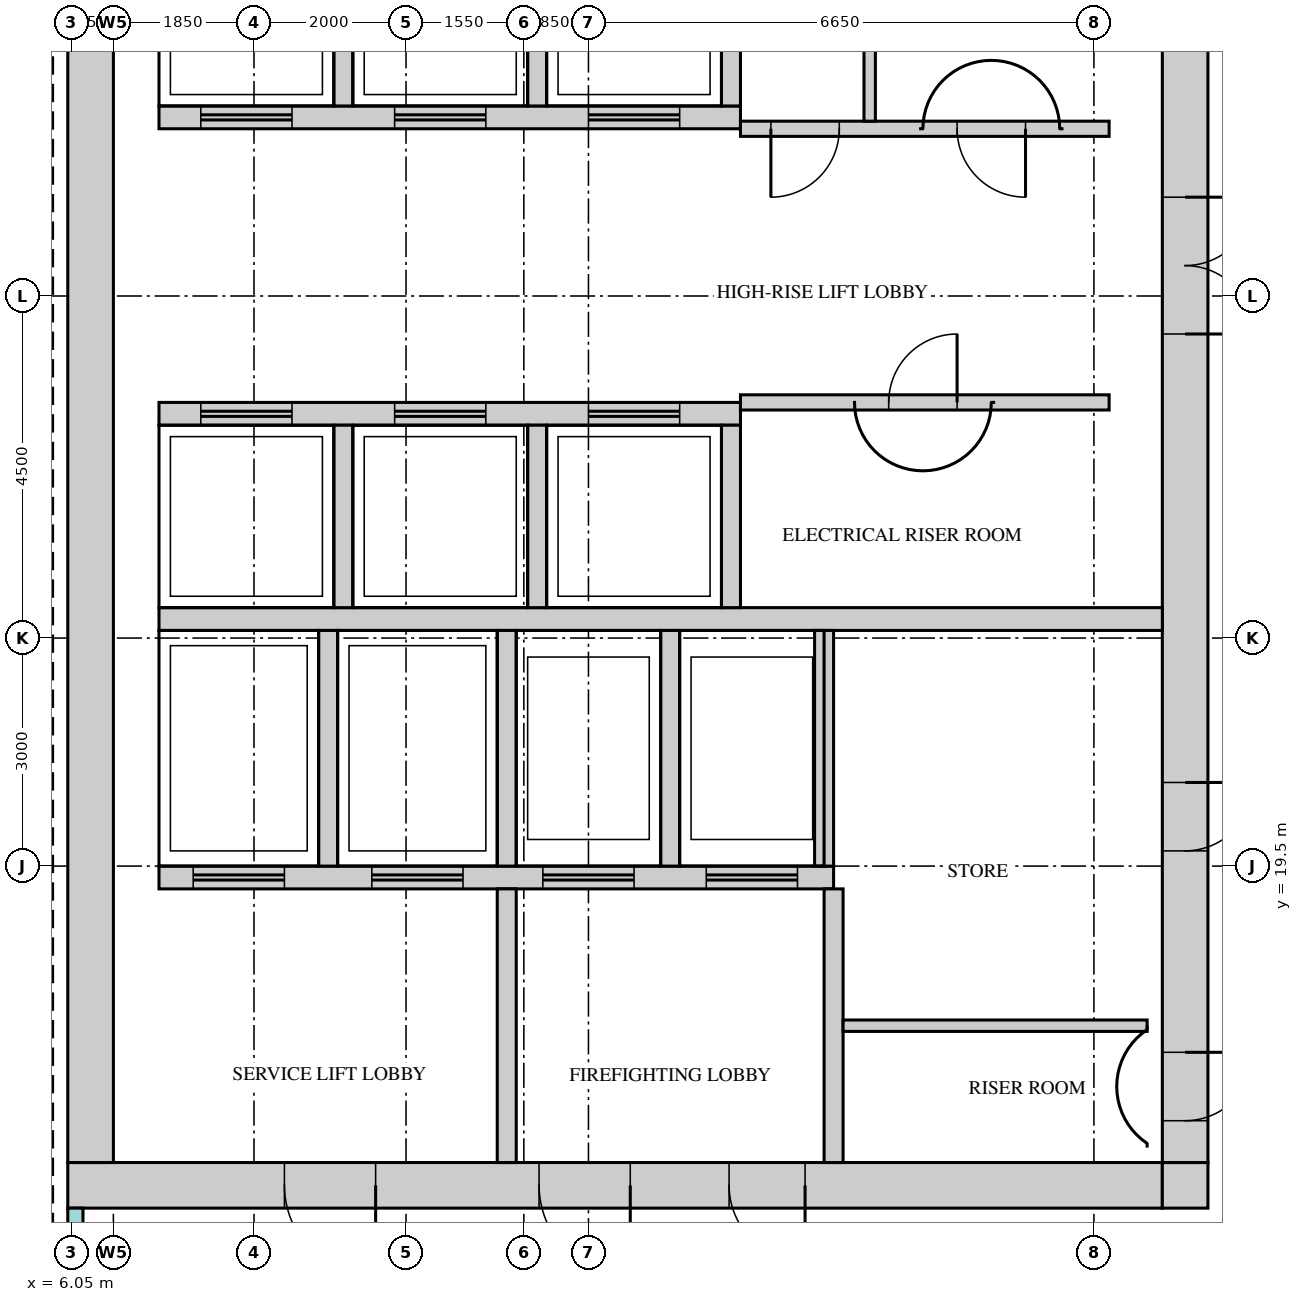
"""IFC4 building model, lengths in metres.
Left out: names, types, materials, properties, quantities, classifications, styles, units other than length and angle.
Written with IfcOpenShell. Run it as: python <this file> out.ifc"""

import sys

from ifc_helpers import new_model, si_unit, direction, frame, frame_2d, origin, place, context, subcontext, project, spatial, rectangle, extrude, source, transform, mapped, element, fill, save


model = new_model("IFC4")
c1 = context("Model", 3, precision=1e-05, world=origin(), true_north=direction((0.0, 1.0)))
c2 = subcontext(c1, "Body", "Model", "MODEL_VIEW")
j1 = project(units=[si_unit("LENGTHUNIT", "METRE"), si_unit("PLANEANGLEUNIT", "RADIAN")], contexts=[c1])
p1 = place(None, origin())
s1 = spatial("IfcSite", under=j1, at=p1, CompositionType="ELEMENT")
p2 = place(p1, origin())
s2 = spatial("IfcBuilding", under=s1, at=p2, CompositionType="ELEMENT")
p3 = place(p2, frame((0.0, 0.0, 302.2)))
s3 = spatial("IfcBuildingStorey", under=s2, at=p3, CompositionType="ELEMENT", Elevation=302.2)
m1 = source(origin(), c2, "Body", "SweptSolid", [
    extrude(rectangle(XDim=14.4, YDim=0.6, at=frame_2d((7.2, 0.0))), origin(), (0.0, 0.0, 1.0), 3.75),
])
p4 = place(p3, frame((6.0, 15.3, 0.0), z_axis=(0.0, 0.0, 1.0), x_axis=(1.0, 0.0, 0.0)))
e1 = element("IfcWall", 1, at=p4, inside=s3, PredefinedType="SHEAR", context=c2, shape_type="MappedRepresentation", body=[
    mapped(m1, transform((0.0, 0.0, 0.0))),
])
m2 = source(origin(), c2, "Body", "SweptSolid", [
    extrude(rectangle(XDim=1.2, YDim=2.1, at=frame_2d((0.6, 1.05))), frame((0.0, 0.31, 0.0), z_axis=(0.0, -1.0, 0.0), x_axis=(1.0, 0.0, 0.0)), (0.0, 0.0, 1.0), 0.62),
])
p5 = place(p4, frame((6.2, 0.0, 0.0)))
e2 = element("IfcOpeningElement", 2, at=p5, cuts=e1, PredefinedType="OPENING", context=c2, shape_type="MappedRepresentation", body=[
    mapped(m2, transform((0.0, 0.0, 0.0))),
])
p6 = place(p4, frame((2.85, 0.0, 0.0)))
e3 = element("IfcOpeningElement", 3, at=p6, cuts=e1, PredefinedType="OPENING", context=c2, shape_type="MappedRepresentation", body=[
    mapped(m2, transform((0.0, 0.0, 0.0))),
])
m3 = source(origin(), c2, "Body", "SweptSolid", [
    extrude(rectangle(XDim=1.0, YDim=2.1, at=frame_2d((0.5, 1.05))), frame((0.0, 0.31, 0.0), z_axis=(0.0, -1.0, 0.0), x_axis=(1.0, 0.0, 0.0)), (0.0, 0.0, 1.0), 0.62),
])
p7 = place(p4, frame((8.7, 0.0, 0.0)))
e4 = element("IfcOpeningElement", 4, at=p7, cuts=e1, PredefinedType="OPENING", context=c2, shape_type="MappedRepresentation", body=[
    mapped(m3, transform((0.0, 0.0, 0.0))),
])
m4 = source(origin(), c2, "Body", "SweptSolid", [
    extrude(rectangle(XDim=0.6, YDim=0.6, at=frame_2d((0.3, 0.0))), origin(), (0.0, 0.0, 1.0), 3.75),
])
p8 = place(p3, frame((20.4, 15.3, 0.0), z_axis=(0.0, 0.0, 1.0), x_axis=(1.0, 0.0, 0.0)))
e5 = element("IfcWall", 5, at=p8, inside=s3, PredefinedType="SHEAR", context=c2, shape_type="MappedRepresentation", body=[
    mapped(m4, transform((0.0, 0.0, 0.0))),
])
m5 = source(origin(), c2, "Body", "SweptSolid", [
    extrude(rectangle(XDim=22.8, YDim=0.6, at=frame_2d((11.4, 0.0))), origin(), (0.0, 0.0, 1.0), 3.75),
])
p9 = place(p3, frame((20.7, 15.6, 0.0), z_axis=(0.0, 0.0, 1.0), x_axis=(0.0, 1.0, 0.0)))
e6 = element("IfcWall", 6, at=p9, inside=s3, PredefinedType="SHEAR", context=c2, shape_type="MappedRepresentation", body=[
    mapped(m5, transform((0.0, 0.0, 0.0))),
])
m6 = source(origin(), c2, "Body", "SweptSolid", [
    extrude(rectangle(XDim=1.8, YDim=2.1, at=frame_2d((0.9, 1.05))), frame((0.0, 0.31, 0.0), z_axis=(0.0, -1.0, 0.0), x_axis=(1.0, 0.0, 0.0)), (0.0, 0.0, 1.0), 0.62),
])
p10 = place(p9, frame((10.9, 0.0, 0.0)))
e7 = element("IfcOpeningElement", 7, at=p10, cuts=e6, PredefinedType="OPENING", context=c2, shape_type="MappedRepresentation", body=[
    mapped(m6, transform((0.0, 0.0, 0.0))),
])
m7 = source(origin(), c2, "Body", "SweptSolid", [
    extrude(rectangle(XDim=0.9, YDim=2.1, at=frame_2d((0.45, 1.05))), frame((0.0, 0.31, 0.0), z_axis=(0.0, -1.0, 0.0), x_axis=(1.0, 0.0, 0.0)), (0.0, 0.0, 1.0), 0.62),
])
p11 = place(p9, frame((0.55, 0.0, 0.0)))
e8 = element("IfcOpeningElement", 8, at=p11, cuts=e6, PredefinedType="OPENING", context=c2, shape_type="MappedRepresentation", body=[
    mapped(m7, transform((0.0, 0.0, 0.0))),
])
p12 = place(p9, frame((4.1, 0.0, 0.0)))
e9 = element("IfcOpeningElement", 9, at=p12, cuts=e6, PredefinedType="OPENING", context=c2, shape_type="MappedRepresentation", body=[
    mapped(m7, transform((0.0, 0.0, 0.0))),
])
p13 = place(p3, frame((6.3, 15.6, 0.0), z_axis=(0.0, 0.0, 1.0), x_axis=(0.0, 1.0, 0.0)))
e10 = element("IfcWall", 10, at=p13, inside=s3, PredefinedType="SHEAR", context=c2, shape_type="MappedRepresentation", body=[
    mapped(m5, transform((0.0, 0.0, 0.0))),
])
m8 = source(origin(), c2, "Body", "SweptSolid", [
    extrude(rectangle(XDim=13.2, YDim=0.3, at=frame_2d((6.6, 0.0))), origin(), (0.0, 0.0, 1.0), 3.75),
])
p14 = place(p3, frame((7.2, 22.75, 0.0), z_axis=(0.0, 0.0, 1.0), x_axis=(1.0, 0.0, 0.0)))
e11 = element("IfcWall", 11, at=p14, inside=s3, PredefinedType="STANDARD", context=c2, shape_type="MappedRepresentation", body=[
    mapped(m8, transform((0.0, 0.0, 0.0))),
])
m9 = source(origin(), c2, "Body", "SweptSolid", [
    extrude(rectangle(XDim=8.875, YDim=0.3, at=frame_2d((4.438, 0.0))), origin(), (0.0, 0.0, 1.0), 3.75),
])
p15 = place(p3, frame((7.2, 19.35, 0.0), z_axis=(0.0, 0.0, 1.0), x_axis=(1.0, 0.0, 0.0)))
e12 = element("IfcWall", 12, at=p15, inside=s3, PredefinedType="STANDARD", context=c2, shape_type="MappedRepresentation", body=[
    mapped(m9, transform((0.0, 0.0, 0.0))),
])
m10 = source(origin(), c2, "Body", "SweptSolid", [
    extrude(rectangle(XDim=1.2, YDim=2.1, at=frame_2d((0.6, 1.05))), frame((0.0, 0.16, 0.0), z_axis=(0.0, -1.0, 0.0), x_axis=(1.0, 0.0, 0.0)), (0.0, 0.0, 1.0), 0.32),
])
p16 = place(p15, frame((0.45, 0.0, 0.0)))
e13 = element("IfcOpeningElement", 13, at=p16, cuts=e12, PredefinedType="OPENING", context=c2, shape_type="MappedRepresentation", body=[
    mapped(m10, transform((0.0, 0.0, 0.0))),
])
p17 = place(p15, frame((2.8, 0.0, 0.0)))
e14 = element("IfcOpeningElement", 14, at=p17, cuts=e12, PredefinedType="OPENING", context=c2, shape_type="MappedRepresentation", body=[
    mapped(m10, transform((0.0, 0.0, 0.0))),
])
p18 = place(p15, frame((5.05, 0.0, 0.0)))
e15 = element("IfcOpeningElement", 15, at=p18, cuts=e12, PredefinedType="OPENING", context=c2, shape_type="MappedRepresentation", body=[
    mapped(m10, transform((0.0, 0.0, 0.0))),
])
p19 = place(p15, frame((7.2, 0.0, 0.0)))
e16 = element("IfcOpeningElement", 16, at=p19, cuts=e12, PredefinedType="OPENING", context=c2, shape_type="MappedRepresentation", body=[
    mapped(m10, transform((0.0, 0.0, 0.0))),
])
m11 = source(origin(), c2, "Body", "SweptSolid", [
    extrude(rectangle(XDim=7.65, YDim=0.3, at=frame_2d((3.825, 0.0))), origin(), (0.0, 0.0, 1.0), 3.75),
])
p20 = place(p3, frame((7.2, 29.35, 0.0), z_axis=(0.0, 0.0, 1.0), x_axis=(1.0, 0.0, 0.0)))
e17 = element("IfcWall", 17, at=p20, inside=s3, PredefinedType="STANDARD", context=c2, shape_type="MappedRepresentation", body=[
    mapped(m11, transform((0.0, 0.0, 0.0))),
])
p21 = place(p20, frame((0.55, 0.0, 0.0)))
e18 = element("IfcOpeningElement", 18, at=p21, cuts=e17, PredefinedType="OPENING", context=c2, shape_type="MappedRepresentation", body=[
    mapped(m10, transform((0.0, 0.0, 0.0))),
])
p22 = place(p20, frame((3.1, 0.0, 0.0)))
e19 = element("IfcOpeningElement", 19, at=p22, cuts=e17, PredefinedType="OPENING", context=c2, shape_type="MappedRepresentation", body=[
    mapped(m10, transform((0.0, 0.0, 0.0))),
])
p23 = place(p20, frame((5.65, 0.0, 0.0)))
e20 = element("IfcOpeningElement", 20, at=p23, cuts=e17, PredefinedType="OPENING", context=c2, shape_type="MappedRepresentation", body=[
    mapped(m10, transform((0.0, 0.0, 0.0))),
])
p24 = place(p3, frame((7.2, 25.45, 0.0), z_axis=(0.0, 0.0, 1.0), x_axis=(1.0, 0.0, 0.0)))
e21 = element("IfcWall", 21, at=p24, inside=s3, PredefinedType="STANDARD", context=c2, shape_type="MappedRepresentation", body=[
    mapped(m11, transform((0.0, 0.0, 0.0))),
])
p25 = place(p24, frame((0.55, 0.0, 0.0)))
e22 = element("IfcOpeningElement", 22, at=p25, cuts=e21, PredefinedType="OPENING", context=c2, shape_type="MappedRepresentation", body=[
    mapped(m10, transform((0.0, 0.0, 0.0))),
])
p26 = place(p24, frame((3.1, 0.0, 0.0)))
e23 = element("IfcOpeningElement", 23, at=p26, cuts=e21, PredefinedType="OPENING", context=c2, shape_type="MappedRepresentation", body=[
    mapped(m10, transform((0.0, 0.0, 0.0))),
])
p27 = place(p24, frame((5.65, 0.0, 0.0)))
e24 = element("IfcOpeningElement", 24, at=p27, cuts=e21, PredefinedType="OPENING", context=c2, shape_type="MappedRepresentation", body=[
    mapped(m10, transform((0.0, 0.0, 0.0))),
])
m12 = source(origin(), c2, "Body", "SweptSolid", [
    extrude(rectangle(XDim=3.1, YDim=0.25, at=frame_2d((1.55, 0.0))), origin(), (0.0, 0.0, 1.0), 3.75),
])
for number, where, z_axis, x_axis in (
    (25, (9.425, 19.5, 0.0), (0.0, 0.0, 1.0), (0.0, 1.0, 0.0)),
    (26, (11.775, 19.5, 0.0), (0.0, 0.0, 1.0), (0.0, 1.0, 0.0)),
    (27, (13.925, 19.5, 0.0), (0.0, 0.0, 1.0), (0.0, 1.0, 0.0)),
    (28, (15.95, 19.5, 0.0), (0.0, 0.0, 1.0), (0.0, 1.0, 0.0)),
):
    element("IfcWall", number, at=place(p3, frame(where, z_axis=z_axis, x_axis=x_axis)), inside=s3, PredefinedType="STANDARD", context=c2, shape_type="MappedRepresentation", body=[
        mapped(m12, transform((0.0, 0.0, 0.0))),
    ])
m13 = source(origin(), c2, "Body", "SweptSolid", [
    extrude(rectangle(XDim=2.4, YDim=0.25, at=frame_2d((1.2, 0.0))), origin(), (0.0, 0.0, 1.0), 3.75),
])
for number, where, z_axis, x_axis in (
    (29, (9.625, 29.5, 0.0), (0.0, 0.0, 1.0), (0.0, 1.0, 0.0)),
    (30, (12.175, 29.5, 0.0), (0.0, 0.0, 1.0), (0.0, 1.0, 0.0)),
    (31, (14.725, 29.5, 0.0), (0.0, 0.0, 1.0), (0.0, 1.0, 0.0)),
):
    element("IfcWall", number, at=place(p3, frame(where, z_axis=z_axis, x_axis=x_axis)), inside=s3, PredefinedType="STANDARD", context=c2, shape_type="MappedRepresentation", body=[
        mapped(m13, transform((0.0, 0.0, 0.0))),
    ])
m14 = source(origin(), c2, "Body", "SweptSolid", [
    extrude(rectangle(XDim=2.4, YDim=0.25, at=frame_2d((1.2, 0.0))), origin(), (0.0, 0.0, 1.0), 3.75),
])
for number, where, z_axis, x_axis in (
    (32, (9.625, 22.9, 0.0), (0.0, 0.0, 1.0), (0.0, 1.0, 0.0)),
    (33, (12.175, 22.9, 0.0), (0.0, 0.0, 1.0), (0.0, 1.0, 0.0)),
    (34, (14.725, 22.9, 0.0), (0.0, 0.0, 1.0), (0.0, 1.0, 0.0)),
):
    element("IfcWall", number, at=place(p3, frame(where, z_axis=z_axis, x_axis=x_axis)), inside=s3, PredefinedType="STANDARD", context=c2, shape_type="MappedRepresentation", body=[
        mapped(m14, transform((0.0, 0.0, 0.0))),
    ])
m15 = source(origin(), c2, "Body", "SweptSolid", [
    extrude(rectangle(XDim=3.6, YDim=0.25, at=frame_2d((1.8, 0.0))), origin(), (0.0, 0.0, 1.0), 3.75),
])
for number, where, z_axis, x_axis in (
    (35, (16.075, 15.6, 0.0), (0.0, 0.0, 1.0), (0.0, 1.0, 0.0)),
    (36, (11.775, 15.6, 0.0), (0.0, 0.0, 1.0), (0.0, 1.0, 0.0)),
):
    element("IfcWall", number, at=place(p3, frame(where, z_axis=z_axis, x_axis=x_axis)), inside=s3, PredefinedType="STANDARD", context=c2, shape_type="MappedRepresentation", body=[
        mapped(m15, transform((0.0, 0.0, 0.0))),
    ])
m16 = source(origin(), c2, "Body", "SweptSolid", [
    extrude(rectangle(XDim=4.0, YDim=0.15, at=frame_2d((2.0, 0.0))), origin(), (0.0, 0.0, 1.0), 3.8),
])
p28 = place(p3, frame((16.2, 17.4, 0.0), z_axis=(0.0, 0.0, 1.0), x_axis=(1.0, 0.0, 0.0)))
e37 = element("IfcWall", 37, at=p28, inside=s3, PredefinedType="PARTITIONING", context=c2, shape_type="MappedRepresentation", body=[
    mapped(m16, transform((0.0, 0.0, 0.0))),
])
m17 = source(origin(), c2, "Body", "SweptSolid", [
    extrude(rectangle(XDim=4.85, YDim=0.2, at=frame_2d((2.425, 0.0))), origin(), (0.0, 0.0, 1.0), 3.8),
])
p29 = place(p3, frame((14.85, 25.6, 0.0), z_axis=(0.0, 0.0, 1.0), x_axis=(1.0, 0.0, 0.0)))
e38 = element("IfcWall", 38, at=p29, inside=s3, PredefinedType="PARTITIONING", context=c2, shape_type="MappedRepresentation", body=[
    mapped(m17, transform((0.0, 0.0, 0.0))),
])
m18 = source(origin(), c2, "Body", "SweptSolid", [
    extrude(rectangle(XDim=0.9, YDim=2.1, at=frame_2d((0.45, 1.05))), frame((0.0, 0.11, 0.0), z_axis=(0.0, -1.0, 0.0), x_axis=(1.0, 0.0, 0.0)), (0.0, 0.0, 1.0), 0.22),
])
p30 = place(p29, frame((1.95, 0.0, 0.0)))
e39 = element("IfcOpeningElement", 39, at=p30, cuts=e38, PredefinedType="OPENING", context=c2, shape_type="MappedRepresentation", body=[
    mapped(m18, transform((0.0, 0.0, 0.0))),
])
p31 = place(p3, frame((14.85, 29.2, 0.0), z_axis=(0.0, 0.0, 1.0), x_axis=(1.0, 0.0, 0.0)))
e40 = element("IfcWall", 40, at=p31, inside=s3, PredefinedType="PARTITIONING", context=c2, shape_type="MappedRepresentation", body=[
    mapped(m17, transform((0.0, 0.0, 0.0))),
])
p32 = place(p31, frame((0.4, 0.0, 0.0)))
e41 = element("IfcOpeningElement", 41, at=p32, cuts=e40, PredefinedType="OPENING", context=c2, shape_type="MappedRepresentation", body=[
    mapped(m18, transform((0.0, 0.0, 0.0))),
])
p33 = place(p31, frame((2.85, 0.0, 0.0)))
e42 = element("IfcOpeningElement", 42, at=p33, cuts=e40, PredefinedType="OPENING", context=c2, shape_type="MappedRepresentation", body=[
    mapped(m18, transform((0.0, 0.0, 0.0))),
])
m19 = source(origin(), c2, "Body", "SweptSolid", [
    extrude(rectangle(XDim=2.8, YDim=0.15, at=frame_2d((1.4, 0.0))), origin(), (0.0, 0.0, 1.0), 3.8),
])
p34 = place(p3, frame((16.55, 29.3, 0.0), z_axis=(0.0, 0.0, 1.0), x_axis=(0.0, 1.0, 0.0)))
e43 = element("IfcWall", 43, at=p34, inside=s3, PredefinedType="PARTITIONING", context=c2, shape_type="MappedRepresentation", body=[
    mapped(m19, transform((0.0, 0.0, 0.0))),
])
m20 = source(origin(), c2, "Body", "SweptSolid", [
    extrude(rectangle(XDim=0.9, YDim=2.1, at=frame_2d((0.45, 1.05))), frame((0.0, 0.025, 0.0), z_axis=(0.0, -1.0, 0.0), x_axis=(1.0, 0.0, 0.0)), (0.0, 0.0, 1.0), 0.05),
])
p35 = place(p30, origin())
e44 = element("IfcDoor", 44, at=p35, inside=s3, OperationType="SINGLE_SWING_LEFT", PredefinedType="DOOR", context=c2, shape_type="MappedRepresentation", body=[
    mapped(m20, transform((0.0, 0.0, 0.0))),
])
fill(e39, e44)
p36 = place(p32, origin())
e45 = element("IfcDoor", 45, at=p36, inside=s3, OperationType="SINGLE_SWING_LEFT", PredefinedType="DOOR", context=c2, shape_type="MappedRepresentation", body=[
    mapped(m20, transform((0.0, 0.0, 0.0))),
])
fill(e41, e45)
p37 = place(p33, origin())
e46 = element("IfcDoor", 46, at=p37, inside=s3, OperationType="SINGLE_SWING_RIGHT", PredefinedType="DOOR", context=c2, shape_type="MappedRepresentation", body=[
    mapped(m20, transform((0.0, 0.0, 0.0))),
])
fill(e42, e46)
m21 = source(origin(), c2, "Body", "SweptSolid", [
    extrude(rectangle(XDim=1.8, YDim=2.1, at=frame_2d((0.9, 1.05))), frame((0.0, 0.25, 0.0), z_axis=(0.0, -1.0, 0.0), x_axis=(1.0, 0.0, 0.0)), (0.0, 0.0, 1.0), 0.5),
])
p38 = place(p10, origin())
e47 = element("IfcDoor", 47, at=p38, inside=s3, OperationType="DOUBLE_DOOR_SINGLE_SWING", PredefinedType="DOOR", context=c2, shape_type="MappedRepresentation", body=[
    mapped(m21, transform((0.0, 0.0, 0.0))),
])
fill(e7, e47)
m22 = source(origin(), c2, "Body", "SweptSolid", [
    extrude(rectangle(XDim=0.9, YDim=2.1, at=frame_2d((0.45, 1.05))), frame((0.0, 0.25, 0.0), z_axis=(0.0, -1.0, 0.0), x_axis=(1.0, 0.0, 0.0)), (0.0, 0.0, 1.0), 0.5),
])
p39 = place(p11, origin())
e48 = element("IfcDoor", 48, at=p39, inside=s3, OperationType="SINGLE_SWING_RIGHT", PredefinedType="DOOR", context=c2, shape_type="MappedRepresentation", body=[
    mapped(m22, transform((0.0, 0.0, 0.0))),
])
fill(e8, e48)
p40 = place(p12, origin())
e49 = element("IfcDoor", 49, at=p40, inside=s3, OperationType="SINGLE_SWING_RIGHT", PredefinedType="DOOR", context=c2, shape_type="MappedRepresentation", body=[
    mapped(m22, transform((0.0, 0.0, 0.0))),
])
fill(e9, e49)
m23 = source(origin(), c2, "Body", "SweptSolid", [
    extrude(rectangle(XDim=1.2, YDim=2.1, at=frame_2d((0.6, 1.05))), frame((0.0, 0.25, 0.0), z_axis=(0.0, -1.0, 0.0), x_axis=(1.0, 0.0, 0.0)), (0.0, 0.0, 1.0), 0.5),
])
p41 = place(p5, origin())
e50 = element("IfcDoor", 50, at=p41, inside=s3, OperationType="SINGLE_SWING_RIGHT", PredefinedType="DOOR", context=c2, shape_type="MappedRepresentation", body=[
    mapped(m23, transform((0.0, 0.0, 0.0))),
])
fill(e2, e50)
p42 = place(p6, origin())
e51 = element("IfcDoor", 51, at=p42, inside=s3, OperationType="SINGLE_SWING_RIGHT", PredefinedType="DOOR", context=c2, shape_type="MappedRepresentation", body=[
    mapped(m23, transform((0.0, 0.0, 0.0))),
])
fill(e3, e51)
m24 = source(origin(), c2, "Body", "SweptSolid", [
    extrude(rectangle(XDim=1.0, YDim=2.1, at=frame_2d((0.5, 1.05))), frame((0.0, 0.25, 0.0), z_axis=(0.0, -1.0, 0.0), x_axis=(1.0, 0.0, 0.0)), (0.0, 0.0, 1.0), 0.5),
])
p43 = place(p7, origin())
e52 = element("IfcDoor", 52, at=p43, inside=s3, OperationType="SINGLE_SWING_RIGHT", PredefinedType="DOOR", context=c2, shape_type="MappedRepresentation", body=[
    mapped(m24, transform((0.0, 0.0, 0.0))),
])
fill(e4, e52)
m25 = source(origin(), c2, "Body", "SweptSolid", [
    extrude(rectangle(XDim=1.2, YDim=2.1, at=frame_2d((0.6, 1.05))), frame((0.0, 0.025, 0.0), z_axis=(0.0, -1.0, 0.0), x_axis=(1.0, 0.0, 0.0)), (0.0, 0.0, 1.0), 0.05),
])
p44 = place(p25, origin())
e53 = element("IfcDoor", 53, at=p44, inside=s3, OperationType="DOUBLE_DOOR_SLIDING", PredefinedType="DOOR", context=c2, shape_type="MappedRepresentation", body=[
    mapped(m25, transform((0.0, 0.0, 0.0))),
])
fill(e22, e53)
p45 = place(p26, origin())
e54 = element("IfcDoor", 54, at=p45, inside=s3, OperationType="DOUBLE_DOOR_SLIDING", PredefinedType="DOOR", context=c2, shape_type="MappedRepresentation", body=[
    mapped(m25, transform((0.0, 0.0, 0.0))),
])
fill(e23, e54)
p46 = place(p27, origin())
e55 = element("IfcDoor", 55, at=p46, inside=s3, OperationType="DOUBLE_DOOR_SLIDING", PredefinedType="DOOR", context=c2, shape_type="MappedRepresentation", body=[
    mapped(m25, transform((0.0, 0.0, 0.0))),
])
fill(e24, e55)
p47 = place(p21, origin())
e56 = element("IfcDoor", 56, at=p47, inside=s3, OperationType="DOUBLE_DOOR_SLIDING", PredefinedType="DOOR", context=c2, shape_type="MappedRepresentation", body=[
    mapped(m25, transform((0.0, 0.0, 0.0))),
])
fill(e18, e56)
p48 = place(p22, origin())
e57 = element("IfcDoor", 57, at=p48, inside=s3, OperationType="DOUBLE_DOOR_SLIDING", PredefinedType="DOOR", context=c2, shape_type="MappedRepresentation", body=[
    mapped(m25, transform((0.0, 0.0, 0.0))),
])
fill(e19, e57)
p49 = place(p23, origin())
e58 = element("IfcDoor", 58, at=p49, inside=s3, OperationType="DOUBLE_DOOR_SLIDING", PredefinedType="DOOR", context=c2, shape_type="MappedRepresentation", body=[
    mapped(m25, transform((0.0, 0.0, 0.0))),
])
fill(e20, e58)
p50 = place(p16, origin())
e59 = element("IfcDoor", 59, at=p50, inside=s3, OperationType="DOUBLE_DOOR_SLIDING", PredefinedType="DOOR", context=c2, shape_type="MappedRepresentation", body=[
    mapped(m25, transform((0.0, 0.0, 0.0))),
])
fill(e13, e59)
p51 = place(p17, origin())
e60 = element("IfcDoor", 60, at=p51, inside=s3, OperationType="DOUBLE_DOOR_SLIDING", PredefinedType="DOOR", context=c2, shape_type="MappedRepresentation", body=[
    mapped(m25, transform((0.0, 0.0, 0.0))),
])
fill(e14, e60)
p52 = place(p18, origin())
e61 = element("IfcDoor", 61, at=p52, inside=s3, OperationType="DOUBLE_DOOR_SLIDING", PredefinedType="DOOR", context=c2, shape_type="MappedRepresentation", body=[
    mapped(m25, transform((0.0, 0.0, 0.0))),
])
fill(e15, e61)
p53 = place(p19, origin())
e62 = element("IfcDoor", 62, at=p53, inside=s3, OperationType="DOUBLE_DOOR_SLIDING", PredefinedType="DOOR", context=c2, shape_type="MappedRepresentation", body=[
    mapped(m25, transform((0.0, 0.0, 0.0))),
])
fill(e16, e62)
save(model, sys.argv[1])
